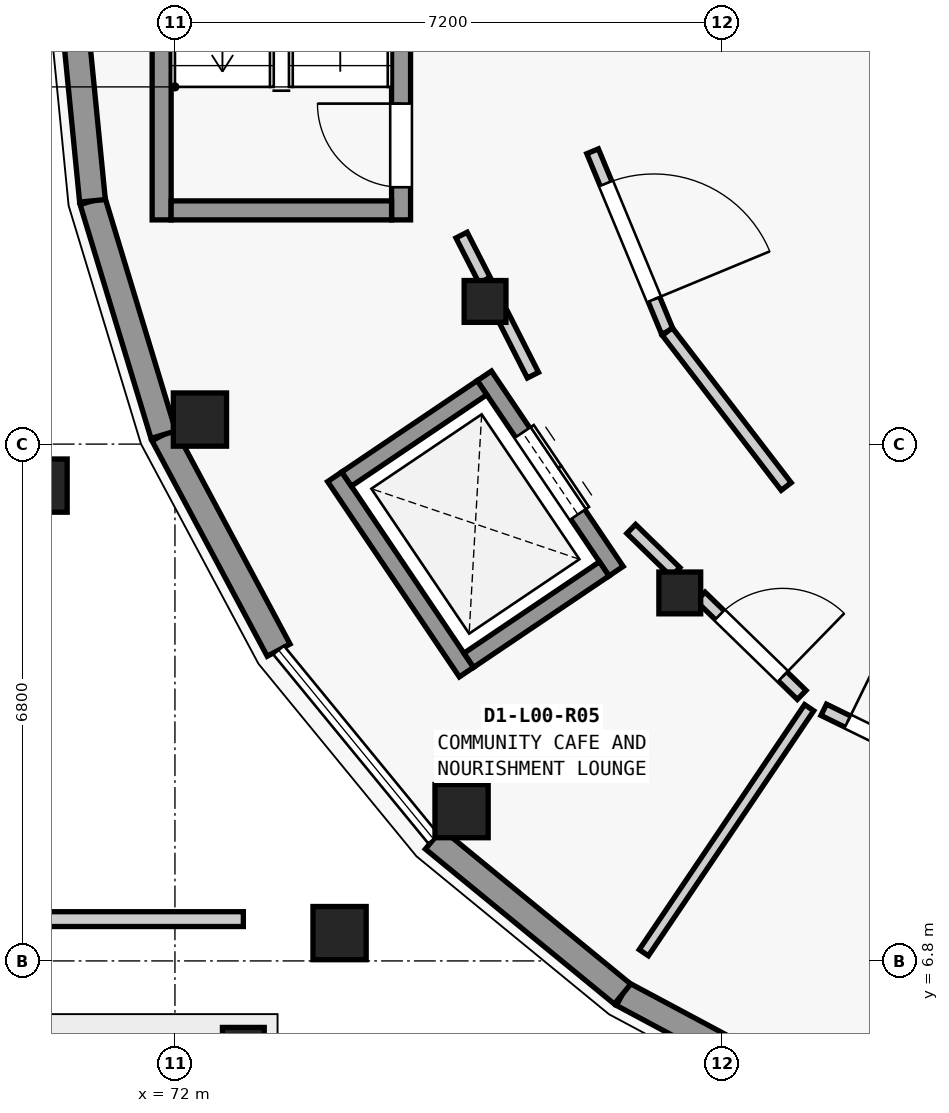
"""IFC4 building model, lengths in metres.
Left out: names, types, materials, properties, quantities, classifications, styles, units other than length and angle.
Written with IfcOpenShell. Run it as: python <this file> out.ifc"""

import sys

from ifc_helpers import new_model, si_unit, direction, frame, frame_2d, origin, origin_2d, place, context, subcontext, project, spatial, rectangle, circle, extrude, element, fill, save


model = new_model("IFC4")
c1 = context("Model", 3, precision=1e-05, world=origin(), true_north=direction((0.0, 1.0)))
c2 = subcontext(c1, "Body", "Model", "MODEL_VIEW")
j1 = project(units=[si_unit("LENGTHUNIT", "METRE"), si_unit("PLANEANGLEUNIT", "RADIAN")], contexts=[c1])
p1 = place(None, origin())
s1 = spatial("IfcSite", under=j1, at=p1, CompositionType="ELEMENT")
p2 = place(p1, origin())
s2 = spatial("IfcBuilding", under=s1, at=p2, CompositionType="ELEMENT")
p3 = place(p2, origin())
s3 = spatial("IfcBuildingStorey", under=s2, at=p3, CompositionType="ELEMENT", Elevation=0.0)
for number, where, z_axis, x_axis in (
    (1, (72.329, 13.923, 0.0), (0.0, 0.0, 1.0), (1.0, 0.0, 0.0)),
    (2, (75.771, 8.771, 0.0), (0.0, 0.0, 1.0), (1.0, 0.0, 0.0)),
):
    element("IfcColumn", number, at=place(p3, frame(where, z_axis=z_axis, x_axis=x_axis)), inside=s3, PredefinedType="COLUMN", context=c2, shape_type="SweptSolid", body=[
        extrude(circle(Radius=0.35, at=origin_2d()), origin(), (0.0, 0.0, 1.0), 4.55),
    ])
for number, where, z_axis, x_axis in (
    (3, (76.08, 15.477, 0.0), (0.0, 0.0, 1.0), (1.0, 0.0, 0.0)),
    (4, (78.642, 11.642, 0.0), (0.0, 0.0, 1.0), (1.0, 0.0, 0.0)),
):
    element("IfcColumn", number, at=place(p3, frame(where, z_axis=z_axis, x_axis=x_axis)), inside=s3, PredefinedType="COLUMN", context=c2, shape_type="SweptSolid", body=[
        extrude(rectangle(XDim=0.55, YDim=0.55, at=origin_2d()), origin(), (0.0, 0.0, 1.0), 4.55),
    ])
p4 = place(p3, frame((72.9, 5.65, 0.0), z_axis=(0.0, 0.0, 1.0), x_axis=(1.0, 0.0, 0.0)))
e5 = element("IfcColumn", 5, at=p4, inside=s3, PredefinedType="PILASTER", context=c2, shape_type="SweptSolid", body=[
    extrude(circle(Radius=0.275, at=origin_2d()), origin(), (0.0, 0.0, 1.0), 4.55),
])
for number, where, z_axis, x_axis in (
    (6, (70.232, 13.054, 0.0), (0.0, 0.0, 1.0), (1.0, 0.0, 0.0)),
    (7, (74.166, 7.166, 0.0), (0.0, 0.0, 1.0), (1.0, 0.0, 0.0)),
):
    element("IfcColumn", number, at=place(p3, frame(where, z_axis=z_axis, x_axis=x_axis)), inside=s3, PredefinedType="COLUMN", context=c2, shape_type="SweptSolid", body=[
        extrude(circle(Radius=0.35, at=origin_2d()), origin(), (0.0, 0.0, 1.0), 4.55),
    ])
for number, where, z_axis, x_axis in (
    (8, (80.724, 4.848, 0.0), (0.0, 0.0, 1.0), (-0.882, 0.472, 0.0)),
    (9, (77.889, 6.364, 0.0), (0.0, 0.0, 1.0), (-0.773, 0.634, 0.0)),
    (10, (73.364, 10.889, 0.0), (0.0, 0.0, 1.0), (-0.472, 0.882, 0.0)),
    (11, (71.848, 13.724, 0.0), (0.0, 0.0, 1.0), (-0.29, 0.957, 0.0)),
):
    element("IfcWall", number, at=place(p3, frame(where, z_axis=z_axis, x_axis=x_axis)), inside=s3, PredefinedType="SOLIDWALL", context=c2, shape_type="SweptSolid", body=[
        extrude(rectangle(XDim=3.215, YDim=0.34, at=frame_2d((1.607, 0.0))), origin(), (0.0, 0.0, 1.0), 3.659),
    ])
p5 = place(p3, frame((70.915, 16.801, 0.0), z_axis=(0.0, 0.0, 1.0), x_axis=(-0.097977057849, 0.995188673637, 0.0)))
e12 = element("IfcWall", 12, at=p5, inside=s3, PredefinedType="SOLIDWALL", context=c2, shape_type="SweptSolid", body=[
    extrude(rectangle(XDim=3.214, YDim=0.34, at=frame_2d((1.607, 0.0))), origin(), (0.0, 0.0, 1.0), 3.659),
])
p6 = place(p3, frame((72.9, 7.35, 0.0), z_axis=(0.0, 0.0, 1.0), x_axis=(-1.0, 0.0, 0.0)))
e13 = element("IfcWall", 13, at=p6, inside=s3, PredefinedType="PARAPET", context=c2, shape_type="SweptSolid", body=[
    extrude(rectangle(XDim=14.398, YDim=0.195, at=frame_2d((7.199, 0.0))), origin(), (0.0, 0.0, 1.0), 2.42),
])
p7 = place(p6, frame((6.424, 0.0, 0.0)))
e14 = element("IfcOpeningElement", 14, at=p7, cuts=e13, PredefinedType="OPENING", context=c2, shape_type="SweptSolid", body=[
    extrude(rectangle(XDim=1.55, YDim=2.1, at=frame_2d((0.775, 1.05))), frame((0.0, 0.107, 0.0), z_axis=(0.0, -1.0, 0.0), x_axis=(1.0, 0.0, 0.0)), (0.0, 0.0, 1.0), 0.215),
])
p8 = place(p3, frame((74.975, 16.55, 0.0), z_axis=(0.0, 0.0, 1.0), x_axis=(0.0, 1.0, 0.0)))
e15 = element("IfcWall", 15, at=p8, inside=s3, PredefinedType="SHEAR", context=c2, shape_type="SweptSolid", body=[
    extrude(rectangle(XDim=6.9, YDim=0.25, at=frame_2d((3.45, 0.0))), origin(), (0.0, 0.0, 1.0), 4.305),
])
p9 = place(p8, frame((0.43, 0.0, 0.0)))
e16 = element("IfcOpeningElement", 16, at=p9, cuts=e15, PredefinedType="OPENING", context=c2, shape_type="SweptSolid", body=[
    extrude(rectangle(XDim=1.1, YDim=2.15, at=frame_2d((0.55, 1.075))), frame((0.0, 0.135, 0.0), z_axis=(0.0, -1.0, 0.0), x_axis=(1.0, 0.0, 0.0)), (0.0, 0.0, 1.0), 0.27),
])
p10 = place(p3, frame((71.825, 16.55, 0.0), z_axis=(0.0, 0.0, 1.0), x_axis=(0.0, 1.0, 0.0)))
e17 = element("IfcWall", 17, at=p10, inside=s3, PredefinedType="SHEAR", context=c2, shape_type="SweptSolid", body=[
    extrude(rectangle(XDim=6.9, YDim=0.25, at=frame_2d((3.45, 0.0))), origin(), (0.0, 0.0, 1.0), 4.305),
])
p11 = place(p3, frame((74.85, 16.675, 0.0), z_axis=(0.0, 0.0, 1.0), x_axis=(-1.0, 0.0, 0.0)))
e18 = element("IfcWall", 18, at=p11, inside=s3, PredefinedType="SHEAR", context=c2, shape_type="SweptSolid", body=[
    extrude(rectangle(XDim=2.9, YDim=0.25, at=frame_2d((1.45, 0.0))), origin(), (0.0, 0.0, 1.0), 4.305),
])
p12 = place(p3, frame((77.804, 11.928, 0.0), z_axis=(0.0, 0.0, 1.0), x_axis=(-0.559054792443, 0.829130712883, 0.0)))
e19 = element("IfcWall", 19, at=p12, inside=s3, PredefinedType="SHEAR", context=c2, shape_type="SweptSolid", body=[
    extrude(rectangle(XDim=3.1, YDim=0.225, at=frame_2d((1.55, 0.0))), origin(), (0.0, 0.0, 1.0), 4.305),
])
p13 = place(p12, frame((0.9, 0.0, 0.0)))
e20 = element("IfcOpeningElement", 20, at=p13, cuts=e19, PredefinedType="OPENING", context=c2, shape_type="SweptSolid", body=[
    extrude(rectangle(XDim=1.3, YDim=2.2, at=frame_2d((0.65, 1.1))), frame((0.0, 0.123, 0.0), z_axis=(0.0, -1.0, 0.0), x_axis=(1.0, 0.0, 0.0)), (0.0, 0.0, 1.0), 0.245),
])
p14 = place(p3, frame((75.835, 10.6, 0.0), z_axis=(0.0, 0.0, 1.0), x_axis=(-0.559091302934, 0.829106093925, 0.0)))
e21 = element("IfcWall", 21, at=p14, inside=s3, PredefinedType="SHEAR", context=c2, shape_type="SweptSolid", body=[
    extrude(rectangle(XDim=3.1, YDim=0.225, at=frame_2d((1.55, 0.0))), origin(), (0.0, 0.0, 1.0), 4.305),
])
p15 = place(p3, frame((77.648, 11.958, 0.0), z_axis=(0.0, 0.0, 1.0), x_axis=(-0.829050086962, -0.559174349652, 0.0)))
e22 = element("IfcWall", 22, at=p15, inside=s3, PredefinedType="SHEAR", context=c2, shape_type="SweptSolid", body=[
    extrude(rectangle(XDim=2.149, YDim=0.225, at=frame_2d((1.075, 0.0))), origin(), (0.0, 0.0, 1.0), 4.305),
])
p16 = place(p3, frame((76.04, 14.342, 0.0), z_axis=(0.0, 0.0, 1.0), x_axis=(-0.828997430928, -0.559252411274, 0.0)))
e23 = element("IfcWall", 23, at=p16, inside=s3, PredefinedType="SHEAR", context=c2, shape_type="SweptSolid", body=[
    extrude(rectangle(XDim=2.15, YDim=0.225, at=frame_2d((1.075, 0.0))), origin(), (0.0, 0.0, 1.0), 4.305),
])
p17 = place(p3, frame((77.495, 17.453, 0.0), z_axis=(0.0, 0.0, 1.0), x_axis=(0.382704397106, -0.923870848353, 0.0)))
e24 = element("IfcWall", 24, at=p17, inside=s3, PredefinedType="PARTITIONING", context=c2, shape_type="SweptSolid", body=[
    extrude(rectangle(XDim=2.568, YDim=0.165, at=frame_2d((1.284, 0.0))), origin(), (0.0, 0.0, 1.0), 3.634),
])
p18 = place(p17, frame((0.459, 0.0, 0.0)))
e25 = element("IfcOpeningElement", 25, at=p18, cuts=e24, PredefinedType="OPENING", context=c2, shape_type="SweptSolid", body=[
    extrude(rectangle(XDim=1.65, YDim=2.4, at=frame_2d((0.825, 1.2))), frame((0.0, 0.093, 0.0), z_axis=(0.0, -1.0, 0.0), x_axis=(1.0, 0.0, 0.0)), (0.0, 0.0, 1.0), 0.185),
])
p19 = place(p3, frame((78.478, 15.08, 0.0), z_axis=(0.0, 0.0, 1.0), x_axis=(0.608782621434, -0.793337078322, 0.0)))
e26 = element("IfcWall", 26, at=p19, inside=s3, PredefinedType="PARTITIONING", context=c2, shape_type="SweptSolid", body=[
    extrude(rectangle(XDim=2.569, YDim=0.165, at=frame_2d((1.285, 0.0))), origin(), (0.0, 0.0, 1.0), 3.634),
])
p20 = place(p3, frame((80.344, 10.132, 0.0), z_axis=(0.0, 0.0, 1.0), x_axis=(-0.559255053263, -0.828995648601, 0.0)))
e27 = element("IfcWall", 27, at=p20, inside=s3, PredefinedType="PARTITIONING", context=c2, shape_type="SweptSolid", body=[
    extrude(rectangle(XDim=3.889, YDim=0.145, at=frame_2d((1.945, 0.0))), origin(), (0.0, 0.0, 1.0), 3.634),
])
p21 = place(p3, frame((75.771, 16.35, 0.0), z_axis=(0.0, 0.0, 1.0), x_axis=(0.454968944113, -0.890507304795, 0.0)))
e28 = element("IfcWall", 28, at=p21, inside=s3, PredefinedType="PARTITIONING", context=c2, shape_type="SweptSolid", body=[
    extrude(rectangle(XDim=0.666, YDim=0.165, at=frame_2d((0.333, 0.0))), origin(), (0.0, 0.0, 1.0), 3.634),
])
p22 = place(p3, frame((76.303, 15.308, 0.0), z_axis=(0.0, 0.0, 1.0), x_axis=(0.452964881354, -0.891528359762, 0.0)))
e29 = element("IfcWall", 29, at=p22, inside=s3, PredefinedType="PARTITIONING", context=c2, shape_type="SweptSolid", body=[
    extrude(rectangle(XDim=0.898, YDim=0.165, at=frame_2d((0.449, 0.0))), origin(), (0.0, 0.0, 1.0), 3.634),
])
p23 = place(p3, frame((78.003, 12.484, 0.0), z_axis=(0.0, 0.0, 1.0), x_axis=(0.716344915194, -0.697746345369, 0.0)))
e30 = element("IfcWall", 30, at=p23, inside=s3, PredefinedType="PARTITIONING", context=c2, shape_type="SweptSolid", body=[
    extrude(rectangle(XDim=0.814, YDim=0.165, at=frame_2d((0.407, 0.0))), origin(), (0.0, 0.0, 1.0), 3.634),
])
p24 = place(p3, frame((78.917, 11.593, 0.0), z_axis=(0.0, 0.0, 1.0), x_axis=(0.716782843261, -0.697296461777, 0.0)))
e31 = element("IfcWall", 31, at=p24, inside=s3, PredefinedType="PARTITIONING", context=c2, shape_type="SweptSolid", body=[
    extrude(rectangle(XDim=1.854, YDim=0.165, at=frame_2d((0.927, 0.0))), origin(), (0.0, 0.0, 1.0), 3.634),
])
p25 = place(p24, frame((0.347, 0.0, 0.0)))
e32 = element("IfcOpeningElement", 32, at=p25, cuts=e31, PredefinedType="OPENING", context=c2, shape_type="SweptSolid", body=[
    extrude(rectangle(XDim=1.16, YDim=2.18, at=frame_2d((0.58, 1.09))), frame((0.0, 0.093, 0.0), z_axis=(0.0, -1.0, 0.0), x_axis=(1.0, 0.0, 0.0)), (0.0, 0.0, 1.0), 0.185),
])
p26 = place(p3, frame((80.536, 10.104, 0.0), z_axis=(0.0, 0.0, 1.0), x_axis=(0.898155885725, -0.4396771599, 0.0)))
e33 = element("IfcWall", 33, at=p26, inside=s3, PredefinedType="PARTITIONING", context=c2, shape_type="SweptSolid", body=[
    extrude(rectangle(XDim=1.922, YDim=0.165, at=frame_2d((0.961, 0.0))), origin(), (0.0, 0.0, 1.0), 3.634),
])
p27 = place(p26, frame((0.351, 0.0, 0.0)))
e34 = element("IfcOpeningElement", 34, at=p27, cuts=e33, PredefinedType="OPENING", context=c2, shape_type="SweptSolid", body=[
    extrude(rectangle(XDim=1.22, YDim=2.18, at=frame_2d((0.61, 1.09))), frame((0.0, 0.093, 0.0), z_axis=(0.0, -1.0, 0.0), x_axis=(1.0, 0.0, 0.0)), (0.0, 0.0, 1.0), 0.185),
])
p28 = place(p9, origin())
e35 = element("IfcDoor", 35, at=p28, inside=s3, OperationType="SINGLE_SWING_RIGHT", PredefinedType="DOOR", context=c2, shape_type="SweptSolid", body=[
    extrude(rectangle(XDim=1.1, YDim=2.15, at=frame_2d((0.55, 1.075))), frame((0.0, 0.025, 0.0), z_axis=(0.0, -1.0, 0.0), x_axis=(1.0, 0.0, 0.0)), (0.0, 0.0, 1.0), 0.05),
])
fill(e16, e35)
p29 = place(p13, origin())
e36 = element("IfcDoor", 36, at=p29, inside=s3, OperationType="DOUBLE_DOOR_SLIDING", PredefinedType="DOOR", context=c2, shape_type="SweptSolid", body=[
    extrude(rectangle(XDim=1.3, YDim=2.2, at=frame_2d((0.65, 1.1))), frame((0.0, 0.025, 0.0), z_axis=(0.0, -1.0, 0.0), x_axis=(1.0, 0.0, 0.0)), (0.0, 0.0, 1.0), 0.05),
])
fill(e20, e36)
p30 = place(p18, origin())
e37 = element("IfcDoor", 37, at=p30, inside=s3, OperationType="SINGLE_SWING_RIGHT", PredefinedType="DOOR", context=c2, shape_type="SweptSolid", body=[
    extrude(rectangle(XDim=1.65, YDim=2.4, at=frame_2d((0.825, 1.2))), frame((0.0, 0.025, 0.0), z_axis=(0.0, -1.0, 0.0), x_axis=(1.0, 0.0, 0.0)), (0.0, 0.0, 1.0), 0.05),
])
fill(e25, e37)
p31 = place(p25, origin())
e38 = element("IfcDoor", 38, at=p31, inside=s3, OperationType="SINGLE_SWING_RIGHT", PredefinedType="DOOR", context=c2, shape_type="SweptSolid", body=[
    extrude(rectangle(XDim=1.16, YDim=2.18, at=frame_2d((0.58, 1.09))), frame((0.0, 0.025, 0.0), z_axis=(0.0, -1.0, 0.0), x_axis=(1.0, 0.0, 0.0)), (0.0, 0.0, 1.0), 0.05),
])
fill(e32, e38)
p32 = place(p27, origin())
e39 = element("IfcDoor", 39, at=p32, inside=s3, OperationType="SINGLE_SWING_LEFT", PredefinedType="DOOR", context=c2, shape_type="SweptSolid", body=[
    extrude(rectangle(XDim=1.22, YDim=2.18, at=frame_2d((0.61, 1.09))), frame((0.0, 0.025, 0.0), z_axis=(0.0, -1.0, 0.0), x_axis=(1.0, 0.0, 0.0)), (0.0, 0.0, 1.0), 0.05),
])
fill(e34, e39)
save(model, sys.argv[1])
